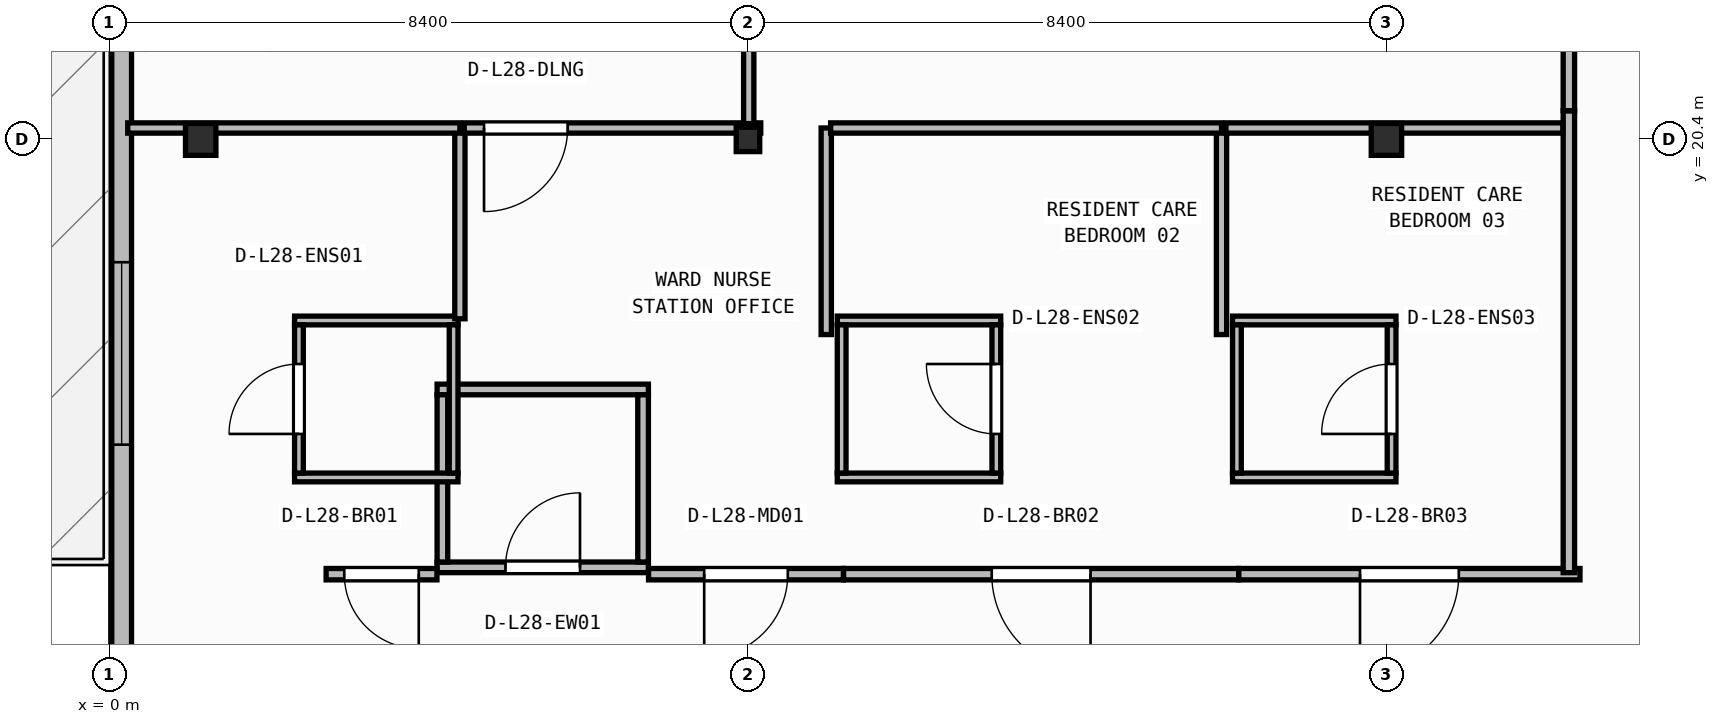
"""IFC4 building model, lengths in metres.
Left out: names, types, materials, properties, quantities, classifications, styles, units other than length and angle.
Written with IfcOpenShell. Run it as: python <this file> out.ifc"""

import sys

from ifc_helpers import new_model, si_unit, direction, frame, frame_2d, origin, origin_2d, place, context, subcontext, project, spatial, rectangle, i_section, extrude, element, fill, save


model = new_model("IFC4")
c1 = context("Model", 3, precision=1e-05, world=origin(), true_north=direction((0.0, 1.0)))
c2 = subcontext(c1, "Body", "Model", "MODEL_VIEW")
j1 = project(units=[si_unit("LENGTHUNIT", "METRE"), si_unit("PLANEANGLEUNIT", "RADIAN")], contexts=[c1])
p1 = place(None, origin())
s1 = spatial("IfcSite", under=j1, at=p1, CompositionType="ELEMENT")
p2 = place(p1, origin())
s2 = spatial("IfcBuilding", under=s1, at=p2, CompositionType="ELEMENT")
p3 = place(p2, frame((0.0, 0.0, 115.2)))
s3 = spatial("IfcBuildingStorey", under=s2, at=p3, CompositionType="ELEMENT", Elevation=115.2)
p4 = place(p3, frame((1.2, 20.4, 0.0), z_axis=(0.0, 0.0, 1.0), x_axis=(1.0, 0.0, 0.0)))
e1 = element("IfcColumn", 1, at=p4, inside=s3, PredefinedType="COLUMN", context=c2, shape_type="SweptSolid", body=[
    extrude(i_section(OverallWidth=0.4, OverallDepth=0.42, WebThickness=0.025, FlangeThickness=0.04, at=origin_2d()), origin(), (0.0, 0.0, 1.0), 3.95),
])
p5 = place(p3, frame((8.4, 20.4, 0.0), z_axis=(0.0, 0.0, 1.0), x_axis=(1.0, 0.0, 0.0)))
e2 = element("IfcColumn", 2, at=p5, inside=s3, PredefinedType="COLUMN", context=c2, shape_type="SweptSolid", body=[
    extrude(i_section(OverallWidth=0.309, OverallDepth=0.321, WebThickness=0.014, FlangeThickness=0.022, FilletRadius=0.017, at=origin_2d()), origin(), (0.0, 0.0, 1.0), 3.95),
])
p6 = place(p3, frame((16.8, 20.4, 0.0), z_axis=(0.0, 0.0, 1.0), x_axis=(1.0, 0.0, 0.0)))
e3 = element("IfcColumn", 3, at=p6, inside=s3, PredefinedType="COLUMN", context=c2, shape_type="SweptSolid", body=[
    extrude(i_section(OverallWidth=0.4, OverallDepth=0.42, WebThickness=0.025, FlangeThickness=0.04, at=origin_2d()), origin(), (0.0, 0.0, 1.0), 3.95),
])
p7 = place(p3, frame((0.16, 40.64, 0.0), z_axis=(0.0, 0.0, 1.0), x_axis=(0.0, -1.0, 0.0)))
e4 = element("IfcWall", 4, at=p7, inside=s3, PredefinedType="STANDARD", context=c2, shape_type="SweptSolid", body=[
    extrude(rectangle(XDim=37.88, YDim=0.26, at=frame_2d((18.94, 0.0))), origin(), (0.0, 0.0, 1.0), 3.71),
])
p8 = place(p7, frame((14.081, 0.0, 0.0)))
e5 = element("IfcOpeningElement", 5, at=p8, cuts=e4, PredefinedType="OPENING", context=c2, shape_type="SweptSolid", body=[
    extrude(rectangle(XDim=1.3, YDim=2.15, at=frame_2d((0.65, 1.075))), frame((0.0, 0.14, 0.0), z_axis=(0.0, -1.0, 0.0), x_axis=(1.0, 0.0, 0.0)), (0.0, 0.0, 1.0), 0.28),
])
p9 = place(p7, frame((21.856, 0.0, 0.9)))
e6 = element("IfcOpeningElement", 6, at=p9, cuts=e4, PredefinedType="OPENING", context=c2, shape_type="SweptSolid", body=[
    extrude(rectangle(XDim=2.4, YDim=1.65, at=frame_2d((1.2, 0.825))), frame((0.0, 0.14, 0.0), z_axis=(0.0, -1.0, 0.0), x_axis=(1.0, 0.0, 0.0)), (0.0, 0.0, 1.0), 0.28),
])
p10 = place(p3, frame((4.31, 14.77, 0.0), z_axis=(0.0, 0.0, 1.0), x_axis=(1.0, 0.0, 0.0)))
e7 = element("IfcWall", 7, at=p10, inside=s3, PredefinedType="PARTITIONING", context=c2, shape_type="SweptSolid", body=[
    extrude(rectangle(XDim=2.78, YDim=0.14, at=frame_2d((1.39, 0.0))), origin(), (0.0, 0.0, 1.0), 3.71),
])
p11 = place(p10, frame((0.9, 0.0, 0.0)))
e8 = element("IfcOpeningElement", 8, at=p11, cuts=e7, PredefinedType="OPENING", context=c2, shape_type="SweptSolid", body=[
    extrude(rectangle(XDim=0.98, YDim=2.1, at=frame_2d((0.49, 1.05))), frame((0.0, 0.08, 0.0), z_axis=(0.0, -1.0, 0.0), x_axis=(1.0, 0.0, 0.0)), (0.0, 0.0, 1.0), 0.16),
])
p12 = place(p3, frame((4.31, 17.11, 0.0), z_axis=(0.0, 0.0, 1.0), x_axis=(1.0, 0.0, 0.0)))
e9 = element("IfcWall", 9, at=p12, inside=s3, PredefinedType="PARTITIONING", context=c2, shape_type="SweptSolid", body=[
    extrude(rectangle(XDim=2.78, YDim=0.14, at=frame_2d((1.39, 0.0))), origin(), (0.0, 0.0, 1.0), 3.71),
])
for number, where, z_axis, x_axis in (
    (10, (4.38, 14.84, 0.0), (0.0, 0.0, 1.0), (0.0, 1.0, 0.0)),
    (11, (7.02, 14.84, 0.0), (0.0, 0.0, 1.0), (0.0, 1.0, 0.0)),
):
    element("IfcWall", number, at=place(p3, frame(where, z_axis=z_axis, x_axis=x_axis)), inside=s3, PredefinedType="PARTITIONING", context=c2, shape_type="SweptSolid", body=[
        extrude(rectangle(XDim=2.2, YDim=0.14, at=frame_2d((1.1, 0.0))), origin(), (0.0, 0.0, 1.0), 3.71),
    ])
for number, where, z_axis, x_axis in (
    (12, (2.435, 15.952, 0.0), (0.0, 0.0, 1.0), (1.0, 0.0, 0.0)),
    (13, (2.435, 18.018, 0.0), (0.0, 0.0, 1.0), (1.0, 0.0, 0.0)),
):
    element("IfcWall", number, at=place(p3, frame(where, z_axis=z_axis, x_axis=x_axis)), inside=s3, PredefinedType="PARTITIONING", context=c2, shape_type="SweptSolid", body=[
        extrude(rectangle(XDim=2.15, YDim=0.115, at=frame_2d((1.075, 0.0))), origin(), (0.0, 0.0, 1.0), 3.71),
    ])
p13 = place(p3, frame((2.492, 16.01, 0.0), z_axis=(0.0, 0.0, 1.0), x_axis=(0.0, 1.0, 0.0)))
e14 = element("IfcWall", 14, at=p13, inside=s3, PredefinedType="PARTITIONING", context=c2, shape_type="SweptSolid", body=[
    extrude(rectangle(XDim=1.95, YDim=0.115, at=frame_2d((0.975, 0.0))), origin(), (0.0, 0.0, 1.0), 3.71),
])
p14 = place(p13, frame((0.515, 0.0, 0.0)))
e15 = element("IfcOpeningElement", 15, at=p14, cuts=e14, PredefinedType="OPENING", context=c2, shape_type="SweptSolid", body=[
    extrude(rectangle(XDim=0.92, YDim=2.1, at=frame_2d((0.46, 1.05))), frame((0.0, 0.067, 0.0), z_axis=(0.0, -1.0, 0.0), x_axis=(1.0, 0.0, 0.0)), (0.0, 0.0, 1.0), 0.135),
])
p15 = place(p3, frame((4.528, 16.01, 0.0), z_axis=(0.0, 0.0, 1.0), x_axis=(0.0, 1.0, 0.0)))
e16 = element("IfcWall", 16, at=p15, inside=s3, PredefinedType="PARTITIONING", context=c2, shape_type="SweptSolid", body=[
    extrude(rectangle(XDim=1.95, YDim=0.115, at=frame_2d((0.975, 0.0))), origin(), (0.0, 0.0, 1.0), 3.71),
])
for number, where, z_axis, x_axis in (
    (17, (9.575, 15.952, 0.0), (0.0, 0.0, 1.0), (1.0, 0.0, 0.0)),
    (18, (9.575, 18.018, 0.0), (0.0, 0.0, 1.0), (1.0, 0.0, 0.0)),
):
    element("IfcWall", number, at=place(p3, frame(where, z_axis=z_axis, x_axis=x_axis)), inside=s3, PredefinedType="PARTITIONING", context=c2, shape_type="SweptSolid", body=[
        extrude(rectangle(XDim=2.15, YDim=0.115, at=frame_2d((1.075, 0.0))), origin(), (0.0, 0.0, 1.0), 3.71),
    ])
p16 = place(p3, frame((9.633, 16.01, 0.0), z_axis=(0.0, 0.0, 1.0), x_axis=(0.0, 1.0, 0.0)))
e19 = element("IfcWall", 19, at=p16, inside=s3, PredefinedType="PARTITIONING", context=c2, shape_type="SweptSolid", body=[
    extrude(rectangle(XDim=1.95, YDim=0.115, at=frame_2d((0.975, 0.0))), origin(), (0.0, 0.0, 1.0), 3.71),
])
p17 = place(p3, frame((11.667, 16.01, 0.0), z_axis=(0.0, 0.0, 1.0), x_axis=(0.0, 1.0, 0.0)))
e20 = element("IfcWall", 20, at=p17, inside=s3, PredefinedType="PARTITIONING", context=c2, shape_type="SweptSolid", body=[
    extrude(rectangle(XDim=1.95, YDim=0.115, at=frame_2d((0.975, 0.0))), origin(), (0.0, 0.0, 1.0), 3.71),
])
p18 = place(p17, frame((0.515, 0.0, 0.0)))
e21 = element("IfcOpeningElement", 21, at=p18, cuts=e20, PredefinedType="OPENING", context=c2, shape_type="SweptSolid", body=[
    extrude(rectangle(XDim=0.92, YDim=2.1, at=frame_2d((0.46, 1.05))), frame((0.0, 0.067, 0.0), z_axis=(0.0, -1.0, 0.0), x_axis=(1.0, 0.0, 0.0)), (0.0, 0.0, 1.0), 0.135),
])
for number, where, z_axis, x_axis in (
    (22, (14.775, 15.952, 0.0), (0.0, 0.0, 1.0), (1.0, 0.0, 0.0)),
    (23, (14.775, 18.018, 0.0), (0.0, 0.0, 1.0), (1.0, 0.0, 0.0)),
):
    element("IfcWall", number, at=place(p3, frame(where, z_axis=z_axis, x_axis=x_axis)), inside=s3, PredefinedType="PARTITIONING", context=c2, shape_type="SweptSolid", body=[
        extrude(rectangle(XDim=2.15, YDim=0.115, at=frame_2d((1.075, 0.0))), origin(), (0.0, 0.0, 1.0), 3.71),
    ])
p19 = place(p3, frame((14.833, 16.01, 0.0), z_axis=(0.0, 0.0, 1.0), x_axis=(0.0, 1.0, 0.0)))
e24 = element("IfcWall", 24, at=p19, inside=s3, PredefinedType="PARTITIONING", context=c2, shape_type="SweptSolid", body=[
    extrude(rectangle(XDim=1.95, YDim=0.115, at=frame_2d((0.975, 0.0))), origin(), (0.0, 0.0, 1.0), 3.71),
])
p20 = place(p3, frame((16.867, 16.01, 0.0), z_axis=(0.0, 0.0, 1.0), x_axis=(0.0, 1.0, 0.0)))
e25 = element("IfcWall", 25, at=p20, inside=s3, PredefinedType="PARTITIONING", context=c2, shape_type="SweptSolid", body=[
    extrude(rectangle(XDim=1.95, YDim=0.115, at=frame_2d((0.975, 0.0))), origin(), (0.0, 0.0, 1.0), 3.71),
])
p21 = place(p20, frame((0.515, 0.0, 0.0)))
e26 = element("IfcOpeningElement", 26, at=p21, cuts=e25, PredefinedType="OPENING", context=c2, shape_type="SweptSolid", body=[
    extrude(rectangle(XDim=0.92, YDim=2.1, at=frame_2d((0.46, 1.05))), frame((0.0, 0.067, 0.0), z_axis=(0.0, -1.0, 0.0), x_axis=(1.0, 0.0, 0.0)), (0.0, 0.0, 1.0), 0.135),
])
p22 = place(p3, frame((4.308, 14.68, 0.0), z_axis=(0.0, 0.0, 1.0), x_axis=(-1.0, 0.0, 0.0)))
e27 = element("IfcWall", 27, at=p22, inside=s3, PredefinedType="PARTITIONING", context=c2, shape_type="SweptSolid", body=[
    extrude(rectangle(XDim=1.458, YDim=0.15, at=frame_2d((0.729, 0.0))), origin(), (0.0, 0.0, 1.0), 3.71),
])
p23 = place(p22, frame((0.239, 0.0, 0.0)))
e28 = element("IfcOpeningElement", 28, at=p23, cuts=e27, PredefinedType="OPENING", context=c2, shape_type="SweptSolid", body=[
    extrude(rectangle(XDim=0.98, YDim=2.1, at=frame_2d((0.49, 1.05))), frame((0.0, 0.085, 0.0), z_axis=(0.0, -1.0, 0.0), x_axis=(1.0, 0.0, 0.0)), (0.0, 0.0, 1.0), 0.17),
])
p24 = place(p3, frame((9.656, 14.68, 0.0), z_axis=(0.0, 0.0, 1.0), x_axis=(-1.0, 0.0, 0.0)))
e29 = element("IfcWall", 29, at=p24, inside=s3, PredefinedType="PARTITIONING", context=c2, shape_type="SweptSolid", body=[
    extrude(rectangle(XDim=2.564, YDim=0.15, at=frame_2d((1.282, 0.0))), origin(), (0.0, 0.0, 1.0), 3.71),
])
p25 = place(p24, frame((0.732, 0.0, 0.0)))
e30 = element("IfcOpeningElement", 30, at=p25, cuts=e29, PredefinedType="OPENING", context=c2, shape_type="SweptSolid", body=[
    extrude(rectangle(XDim=1.1, YDim=2.1, at=frame_2d((0.55, 1.05))), frame((0.0, 0.085, 0.0), z_axis=(0.0, -1.0, 0.0), x_axis=(1.0, 0.0, 0.0)), (0.0, 0.0, 1.0), 0.17),
])
p26 = place(p3, frame((14.856, 14.68, 0.0), z_axis=(0.0, 0.0, 1.0), x_axis=(-1.0, 0.0, 0.0)))
e31 = element("IfcWall", 31, at=p26, inside=s3, PredefinedType="PARTITIONING", context=c2, shape_type="SweptSolid", body=[
    extrude(rectangle(XDim=5.198, YDim=0.15, at=frame_2d((2.599, 0.0))), origin(), (0.0, 0.0, 1.0), 3.71),
])
p27 = place(p26, frame((1.949, 0.0, 0.0)))
e32 = element("IfcOpeningElement", 32, at=p27, cuts=e31, PredefinedType="OPENING", context=c2, shape_type="SweptSolid", body=[
    extrude(rectangle(XDim=1.3, YDim=2.15, at=frame_2d((0.65, 1.075))), frame((0.0, 0.085, 0.0), z_axis=(0.0, -1.0, 0.0), x_axis=(1.0, 0.0, 0.0)), (0.0, 0.0, 1.0), 0.17),
])
p28 = place(p3, frame((19.346, 14.68, 0.0), z_axis=(0.0, 0.0, 1.0), x_axis=(-1.0, 0.0, 0.0)))
e33 = element("IfcWall", 33, at=p28, inside=s3, PredefinedType="PARTITIONING", context=c2, shape_type="SweptSolid", body=[
    extrude(rectangle(XDim=4.488, YDim=0.15, at=frame_2d((2.244, 0.0))), origin(), (0.0, 0.0, 1.0), 3.71),
])
p29 = place(p28, frame((1.594, 0.0, 0.0)))
e34 = element("IfcOpeningElement", 34, at=p29, cuts=e33, PredefinedType="OPENING", context=c2, shape_type="SweptSolid", body=[
    extrude(rectangle(XDim=1.3, YDim=2.15, at=frame_2d((0.65, 1.075))), frame((0.0, 0.085, 0.0), z_axis=(0.0, -1.0, 0.0), x_axis=(1.0, 0.0, 0.0)), (0.0, 0.0, 1.0), 0.17),
])
p30 = place(p3, frame((19.2, 20.776, 0.0), z_axis=(0.0, 0.0, 1.0), x_axis=(0.0, -1.0, 0.0)))
e35 = element("IfcWall", 35, at=p30, inside=s3, PredefinedType="PARTITIONING", context=c2, shape_type="SweptSolid", body=[
    extrude(rectangle(XDim=6.076, YDim=0.15, at=frame_2d((3.038, 0.0))), origin(), (0.0, 0.0, 1.0), 3.71),
])
p31 = place(p3, frame((19.2, 27.26, 0.0), z_axis=(0.0, 0.0, 1.0), x_axis=(0.0, -1.0, 0.0)))
e36 = element("IfcWall", 36, at=p31, inside=s3, PredefinedType="PARTITIONING", context=c2, shape_type="SweptSolid", body=[
    extrude(rectangle(XDim=6.482, YDim=0.15, at=frame_2d((3.241, 0.0))), origin(), (0.0, 0.0, 1.0), 3.71),
])
p32 = place(p31, frame((2.068, 0.0, 0.0)))
e37 = element("IfcOpeningElement", 37, at=p32, cuts=e36, PredefinedType="OPENING", context=c2, shape_type="SweptSolid", body=[
    extrude(rectangle(XDim=1.1, YDim=2.1, at=frame_2d((0.55, 1.05))), frame((0.0, 0.085, 0.0), z_axis=(0.0, -1.0, 0.0), x_axis=(1.0, 0.0, 0.0)), (0.0, 0.0, 1.0), 0.17),
])
p33 = place(p3, frame((4.61, 18.04, 0.0), z_axis=(0.0, 0.0, 1.0), x_axis=(0.0, 1.0, 0.0)))
e38 = element("IfcWall", 38, at=p33, inside=s3, PredefinedType="PARTITIONING", context=c2, shape_type="SweptSolid", body=[
    extrude(rectangle(XDim=2.51, YDim=0.135, at=frame_2d((1.255, 0.0))), origin(), (0.0, 0.0, 1.0), 3.71),
])
p34 = place(p3, frame((4.61, 20.55, 0.0), z_axis=(0.0, 0.0, 1.0), x_axis=(-1.0, 0.0, 0.0)))
e39 = element("IfcWall", 39, at=p34, inside=s3, PredefinedType="PARTITIONING", context=c2, shape_type="SweptSolid", body=[
    extrude(rectangle(XDim=4.37, YDim=0.135, at=frame_2d((2.185, 0.0))), origin(), (0.0, 0.0, 1.0), 3.083),
])
p35 = place(p3, frame((9.43, 17.833, 0.0), z_axis=(0.0, 0.0, 1.0), x_axis=(0.0, 1.0, 0.0)))
e40 = element("IfcWall", 40, at=p35, inside=s3, PredefinedType="PARTITIONING", context=c2, shape_type="SweptSolid", body=[
    extrude(rectangle(XDim=2.718, YDim=0.135, at=frame_2d((1.359, 0.0))), origin(), (0.0, 0.0, 1.0), 3.71),
])
p36 = place(p3, frame((8.568, 20.55, 0.0), z_axis=(0.0, 0.0, 1.0), x_axis=(-1.0, 0.0, 0.0)))
e41 = element("IfcWall", 41, at=p36, inside=s3, PredefinedType="PARTITIONING", context=c2, shape_type="SweptSolid", body=[
    extrude(rectangle(XDim=3.901, YDim=0.135, at=frame_2d((1.95, 0.0))), origin(), (0.0, 0.0, 1.0), 3.083),
])
p37 = place(p36, frame((2.541, 0.0, 0.0)))
e42 = element("IfcOpeningElement", 42, at=p37, cuts=e41, PredefinedType="OPENING", context=c2, shape_type="SweptSolid", body=[
    extrude(rectangle(XDim=1.1, YDim=2.1, at=frame_2d((0.55, 1.05))), frame((0.0, 0.077, 0.0), z_axis=(0.0, -1.0, 0.0), x_axis=(1.0, 0.0, 0.0)), (0.0, 0.0, 1.0), 0.155),
])
p38 = place(p3, frame((14.63, 17.833, 0.0), z_axis=(0.0, 0.0, 1.0), x_axis=(0.0, 1.0, 0.0)))
e43 = element("IfcWall", 43, at=p38, inside=s3, PredefinedType="PARTITIONING", context=c2, shape_type="SweptSolid", body=[
    extrude(rectangle(XDim=2.718, YDim=0.135, at=frame_2d((1.359, 0.0))), origin(), (0.0, 0.0, 1.0), 3.71),
])
p39 = place(p3, frame((14.63, 20.55, 0.0), z_axis=(0.0, 0.0, 1.0), x_axis=(-1.0, 0.0, 0.0)))
e44 = element("IfcWall", 44, at=p39, inside=s3, PredefinedType="PARTITIONING", context=c2, shape_type="SweptSolid", body=[
    extrude(rectangle(XDim=5.142, YDim=0.135, at=frame_2d((2.571, 0.0))), origin(), (0.0, 0.0, 1.0), 3.083),
])
p40 = place(p3, frame((19.12, 20.55, 0.0), z_axis=(0.0, 0.0, 1.0), x_axis=(-1.0, 0.0, 0.0)))
e45 = element("IfcWall", 45, at=p40, inside=s3, PredefinedType="PARTITIONING", context=c2, shape_type="SweptSolid", body=[
    extrude(rectangle(XDim=4.433, YDim=0.135, at=frame_2d((2.216, 0.0))), origin(), (0.0, 0.0, 1.0), 3.083),
])
p41 = place(p3, frame((8.41, 20.607, 0.0), z_axis=(0.0, 0.0, 1.0), x_axis=(0.0, 1.0, 0.0)))
e46 = element("IfcWall", 46, at=p41, inside=s3, PredefinedType="PARTITIONING", context=c2, shape_type="SweptSolid", body=[
    extrude(rectangle(XDim=6.493, YDim=0.135, at=frame_2d((3.246, 0.0))), origin(), (0.0, 0.0, 1.0), 3.152),
])
p42 = place(p11, origin())
e47 = element("IfcDoor", 47, at=p42, inside=s3, OperationType="SINGLE_SWING_RIGHT", PredefinedType="DOOR", context=c2, shape_type="SweptSolid", body=[
    extrude(rectangle(XDim=0.98, YDim=2.1, at=frame_2d((0.49, 1.05))), frame((0.0, 0.025, 0.0), z_axis=(0.0, -1.0, 0.0), x_axis=(1.0, 0.0, 0.0)), (0.0, 0.0, 1.0), 0.05),
])
fill(e8, e47)
p43 = place(p14, origin())
e48 = element("IfcDoor", 48, at=p43, inside=s3, OperationType="SINGLE_SWING_LEFT", PredefinedType="DOOR", context=c2, shape_type="SweptSolid", body=[
    extrude(rectangle(XDim=0.92, YDim=2.1, at=frame_2d((0.46, 1.05))), frame((0.0, 0.025, 0.0), z_axis=(0.0, -1.0, 0.0), x_axis=(1.0, 0.0, 0.0)), (0.0, 0.0, 1.0), 0.05),
])
fill(e15, e48)
p44 = place(p18, origin())
e49 = element("IfcDoor", 49, at=p44, inside=s3, OperationType="SINGLE_SWING_RIGHT", PredefinedType="DOOR", context=c2, shape_type="SweptSolid", body=[
    extrude(rectangle(XDim=0.92, YDim=2.1, at=frame_2d((0.46, 1.05))), frame((0.0, 0.025, 0.0), z_axis=(0.0, -1.0, 0.0), x_axis=(1.0, 0.0, 0.0)), (0.0, 0.0, 1.0), 0.05),
])
fill(e21, e49)
p45 = place(p21, origin())
e50 = element("IfcDoor", 50, at=p45, inside=s3, OperationType="SINGLE_SWING_LEFT", PredefinedType="DOOR", context=c2, shape_type="SweptSolid", body=[
    extrude(rectangle(XDim=0.92, YDim=2.1, at=frame_2d((0.46, 1.05))), frame((0.0, 0.025, 0.0), z_axis=(0.0, -1.0, 0.0), x_axis=(1.0, 0.0, 0.0)), (0.0, 0.0, 1.0), 0.05),
])
fill(e26, e50)
p46 = place(p23, origin())
e51 = element("IfcDoor", 51, at=p46, inside=s3, OperationType="SINGLE_SWING_LEFT", PredefinedType="DOOR", context=c2, shape_type="SweptSolid", body=[
    extrude(rectangle(XDim=0.98, YDim=2.1, at=frame_2d((0.49, 1.05))), frame((0.0, 0.025, 0.0), z_axis=(0.0, -1.0, 0.0), x_axis=(1.0, 0.0, 0.0)), (0.0, 0.0, 1.0), 0.05),
])
fill(e28, e51)
p47 = place(p25, origin())
e52 = element("IfcDoor", 52, at=p47, inside=s3, OperationType="SINGLE_SWING_RIGHT", PredefinedType="DOOR", context=c2, shape_type="SweptSolid", body=[
    extrude(rectangle(XDim=1.1, YDim=2.1, at=frame_2d((0.55, 1.05))), frame((0.0, 0.025, 0.0), z_axis=(0.0, -1.0, 0.0), x_axis=(1.0, 0.0, 0.0)), (0.0, 0.0, 1.0), 0.05),
])
fill(e30, e52)
p48 = place(p27, origin())
e53 = element("IfcDoor", 53, at=p48, inside=s3, OperationType="SINGLE_SWING_LEFT", PredefinedType="DOOR", context=c2, shape_type="SweptSolid", body=[
    extrude(rectangle(XDim=1.3, YDim=2.15, at=frame_2d((0.65, 1.075))), frame((0.0, 0.025, 0.0), z_axis=(0.0, -1.0, 0.0), x_axis=(1.0, 0.0, 0.0)), (0.0, 0.0, 1.0), 0.05),
])
fill(e32, e53)
p49 = place(p29, origin())
e54 = element("IfcDoor", 54, at=p49, inside=s3, OperationType="SINGLE_SWING_RIGHT", PredefinedType="DOOR", context=c2, shape_type="SweptSolid", body=[
    extrude(rectangle(XDim=1.3, YDim=2.15, at=frame_2d((0.65, 1.075))), frame((0.0, 0.025, 0.0), z_axis=(0.0, -1.0, 0.0), x_axis=(1.0, 0.0, 0.0)), (0.0, 0.0, 1.0), 0.05),
])
fill(e34, e54)
p50 = place(p37, origin())
e55 = element("IfcDoor", 55, at=p50, inside=s3, OperationType="SINGLE_SWING_RIGHT", PredefinedType="DOOR", context=c2, shape_type="SweptSolid", body=[
    extrude(rectangle(XDim=1.1, YDim=2.1, at=frame_2d((0.55, 1.05))), frame((0.0, 0.025, 0.0), z_axis=(0.0, -1.0, 0.0), x_axis=(1.0, 0.0, 0.0)), (0.0, 0.0, 1.0), 0.05),
])
fill(e42, e55)
p51 = place(p9, origin())
e56 = element("IfcWindow", 56, at=p51, inside=s3, PartitioningType="SINGLE_PANEL", PredefinedType="WINDOW", context=c2, shape_type="SweptSolid", body=[
    extrude(rectangle(XDim=2.4, YDim=1.65, at=frame_2d((1.2, 0.825))), frame((0.0, 0.03, 0.0), z_axis=(0.0, -1.0, 0.0), x_axis=(1.0, 0.0, 0.0)), (0.0, 0.0, 1.0), 0.06),
])
fill(e6, e56)
save(model, sys.argv[1])
